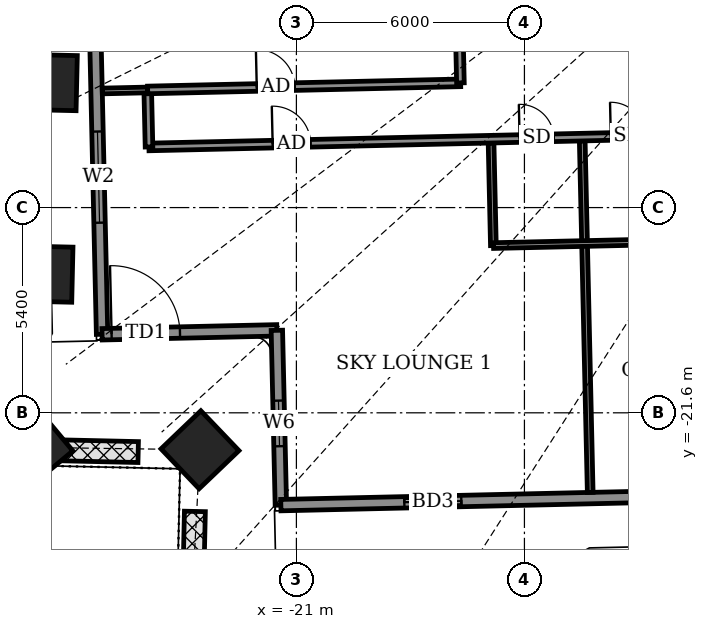
"""IFC4 building model, lengths in metres.
Left out: names, types, materials, properties, quantities, classifications, styles, units other than length and angle.
Written with IfcOpenShell. Run it as: python <this file> out.ifc"""

import sys

from ifc_helpers import new_model, si_unit, direction, frame, frame_2d, origin, origin_2d, place, context, subcontext, project, spatial, rectangle, extrude, element, fill, save


model = new_model("IFC4")
c1 = context("Model", 3, precision=1e-05, world=origin(), true_north=direction((0.0, 1.0)))
c2 = subcontext(c1, "Body", "Model", "MODEL_VIEW")
j1 = project(units=[si_unit("LENGTHUNIT", "METRE"), si_unit("PLANEANGLEUNIT", "RADIAN")], contexts=[c1])
p1 = place(None, origin())
s1 = spatial("IfcSite", under=j1, at=p1, CompositionType="ELEMENT")
p2 = place(p1, origin())
s2 = spatial("IfcBuilding", under=s1, at=p2, CompositionType="ELEMENT")
p3 = place(p2, frame((0.0, 0.0, 74.7)))
s3 = spatial("IfcBuildingStorey", under=s2, at=p3, CompositionType="ELEMENT", Elevation=74.7)
for number, where, z_axis, x_axis in (
    (1, (-27.506, -12.909, -0.55), (0.0, 0.0, 1.0), (-0.023, -1.0, 0.0)),
    (2, (-27.62, -17.949, -0.55), (0.0, 0.0, 1.0), (-0.023, -1.0, 0.0)),
    (3, (-27.903, -22.51, -0.55), (0.0, 0.0, 1.0), (0.64, -0.768, 0.0)),
    (4, (-23.537, -22.572, -0.55), (0.0, 0.0, 1.0), (0.691, -0.723, 0.0)),
):
    element("IfcColumn", number, at=place(p3, frame(where, z_axis=z_axis, x_axis=x_axis)), inside=s3, PredefinedType="COLUMN", context=c2, shape_type="SweptSolid", body=[
        extrude(rectangle(XDim=1.45, YDim=1.45, at=origin_2d()), origin(), (0.0, 0.0, 1.0), 4.6),
    ])
p4 = place(p3, frame((-26.424, -5.808, 0.0), z_axis=(0.0, 0.0, 1.0), x_axis=(0.022654755793, -0.999743348085, 0.0)))
e5 = element("IfcWall", 5, at=p4, inside=s3, PredefinedType="SOLIDWALL", context=c2, shape_type="SweptSolid", body=[
    extrude(rectangle(XDim=13.729, YDim=0.3, at=frame_2d((6.865, 0.0))), origin(), (0.0, 0.0, 1.0), 2.45),
])
p5 = place(p4, frame((2.913, 0.0, 0.0)))
e6 = element("IfcOpeningElement", 6, at=p5, cuts=e5, PredefinedType="OPENING", context=c2, shape_type="SweptSolid", body=[
    extrude(rectangle(XDim=1.2, YDim=2.4, at=frame_2d((0.6, 1.2))), frame((0.0, 0.16, 0.0), z_axis=(0.0, -1.0, 0.0), x_axis=(1.0, 0.0, 0.0)), (0.0, 0.0, 1.0), 0.32),
])
p6 = place(p4, frame((4.823, 0.0, 0.9)))
e7 = element("IfcOpeningElement", 7, at=p6, cuts=e5, PredefinedType="OPENING", context=c2, shape_type="SweptSolid", body=[
    extrude(rectangle(XDim=1.2, YDim=1.5, at=frame_2d((0.6, 0.75))), frame((0.0, 0.16, 0.0), z_axis=(0.0, -1.0, 0.0), x_axis=(1.0, 0.0, 0.0)), (0.0, 0.0, 1.0), 0.32),
])
p7 = place(p4, frame((8.393, 0.0, 0.9)))
e8 = element("IfcOpeningElement", 8, at=p7, cuts=e5, PredefinedType="OPENING", context=c2, shape_type="SweptSolid", body=[
    extrude(rectangle(XDim=2.4, YDim=1.5, at=frame_2d((1.2, 0.75))), frame((0.0, 0.16, 0.0), z_axis=(0.0, -1.0, 0.0), x_axis=(1.0, 0.0, 0.0)), (0.0, 0.0, 1.0), 0.32),
])
p8 = place(p3, frame((-26.113, -19.534, 0.0), z_axis=(0.0, 0.0, 1.0), x_axis=(0.999744404568, 0.02260808559, 0.0)))
e9 = element("IfcWall", 9, at=p8, inside=s3, PredefinedType="SOLIDWALL", context=c2, shape_type="SweptSolid", body=[
    extrude(rectangle(XDim=4.6, YDim=0.3, at=frame_2d((2.3, 0.0))), origin(), (0.0, 0.0, 1.0), 2.45),
])
p9 = place(p8, frame((0.25, 0.0, 0.0)))
e10 = element("IfcOpeningElement", 10, at=p9, cuts=e9, PredefinedType="OPENING", context=c2, shape_type="SweptSolid", body=[
    extrude(rectangle(XDim=1.8, YDim=2.4, at=frame_2d((0.9, 1.2))), frame((0.0, 0.16, 0.0), z_axis=(0.0, -1.0, 0.0), x_axis=(1.0, 0.0, 0.0)), (0.0, 0.0, 1.0), 0.32),
])
p10 = place(p3, frame((-21.514, -19.43, 0.0), z_axis=(0.0, 0.0, 1.0), x_axis=(0.022820258049, -0.999739584003, 0.0)))
e11 = element("IfcWall", 11, at=p10, inside=s3, PredefinedType="SOLIDWALL", context=c2, shape_type="SweptSolid", body=[
    extrude(rectangle(XDim=4.6, YDim=0.3, at=frame_2d((2.3, 0.0))), origin(), (0.0, 0.0, 1.0), 2.1),
])
p11 = place(p10, frame((1.85, 0.0, 0.5)))
e12 = element("IfcOpeningElement", 12, at=p11, cuts=e11, PredefinedType="OPENING", context=c2, shape_type="SweptSolid", body=[
    extrude(rectangle(XDim=1.2, YDim=1.1, at=frame_2d((0.6, 0.55))), frame((0.0, 0.16, 0.0), z_axis=(0.0, -1.0, 0.0), x_axis=(1.0, 0.0, 0.0)), (0.0, 0.0, 1.0), 0.32),
])
p12 = place(p3, frame((-21.409, -24.029, 0.0), z_axis=(0.0, 0.0, 1.0), x_axis=(0.999742634032, 0.022686244721, 0.0)))
e13 = element("IfcWall", 13, at=p12, inside=s3, PredefinedType="SOLIDWALL", context=c2, shape_type="SweptSolid", body=[
    extrude(rectangle(XDim=46.372, YDim=0.3, at=frame_2d((23.186, 0.0))), origin(), (0.0, 0.0, 1.0), 2.1),
])
p13 = place(p12, frame((3.25, 0.0, 0.0)))
e14 = element("IfcOpeningElement", 14, at=p13, cuts=e13, PredefinedType="OPENING", context=c2, shape_type="SweptSolid", body=[
    extrude(rectangle(XDim=1.5, YDim=2.0, at=frame_2d((0.75, 1.0))), frame((0.0, 0.16, 0.0), z_axis=(0.0, -1.0, 0.0), x_axis=(1.0, 0.0, 0.0)), (0.0, 0.0, 1.0), 0.32),
])
p14 = place(p12, frame((10.575, 0.0, 0.5)))
e15 = element("IfcOpeningElement", 15, at=p14, cuts=e13, PredefinedType="OPENING", context=c2, shape_type="SweptSolid", body=[
    extrude(rectangle(XDim=1.2, YDim=1.1, at=frame_2d((0.6, 0.55))), frame((0.0, 0.16, 0.0), z_axis=(0.0, -1.0, 0.0), x_axis=(1.0, 0.0, 0.0)), (0.0, 0.0, 1.0), 0.32),
])
p15 = place(p12, frame((15.95, 0.0, 0.5)))
e16 = element("IfcOpeningElement", 16, at=p15, cuts=e13, PredefinedType="OPENING", context=c2, shape_type="SweptSolid", body=[
    extrude(rectangle(XDim=1.2, YDim=1.1, at=frame_2d((0.6, 0.55))), frame((0.0, 0.16, 0.0), z_axis=(0.0, -1.0, 0.0), x_axis=(1.0, 0.0, 0.0)), (0.0, 0.0, 1.0), 0.32),
])
p16 = place(p12, frame((20.575, 0.0, 0.0)))
e17 = element("IfcOpeningElement", 17, at=p16, cuts=e13, PredefinedType="OPENING", context=c2, shape_type="SweptSolid", body=[
    extrude(rectangle(XDim=1.5, YDim=2.0, at=frame_2d((0.75, 1.0))), frame((0.0, 0.16, 0.0), z_axis=(0.0, -1.0, 0.0), x_axis=(1.0, 0.0, 0.0)), (0.0, 0.0, 1.0), 0.32),
])
p17 = place(p12, frame((25.35, 0.0, 0.0)))
e18 = element("IfcOpeningElement", 18, at=p17, cuts=e13, PredefinedType="OPENING", context=c2, shape_type="SweptSolid", body=[
    extrude(rectangle(XDim=1.5, YDim=2.0, at=frame_2d((0.75, 1.0))), frame((0.0, 0.16, 0.0), z_axis=(0.0, -1.0, 0.0), x_axis=(1.0, 0.0, 0.0)), (0.0, 0.0, 1.0), 0.32),
])
p18 = place(p12, frame((30.125, 0.0, 0.0)))
e19 = element("IfcOpeningElement", 19, at=p18, cuts=e13, PredefinedType="OPENING", context=c2, shape_type="SweptSolid", body=[
    extrude(rectangle(XDim=1.5, YDim=2.0, at=frame_2d((0.75, 1.0))), frame((0.0, 0.16, 0.0), z_axis=(0.0, -1.0, 0.0), x_axis=(1.0, 0.0, 0.0)), (0.0, 0.0, 1.0), 0.32),
])
p19 = place(p12, frame((36.975, 0.0, 0.5)))
e20 = element("IfcOpeningElement", 20, at=p19, cuts=e13, PredefinedType="OPENING", context=c2, shape_type="SweptSolid", body=[
    extrude(rectangle(XDim=1.2, YDim=1.1, at=frame_2d((0.6, 0.55))), frame((0.0, 0.16, 0.0), z_axis=(0.0, -1.0, 0.0), x_axis=(1.0, 0.0, 0.0)), (0.0, 0.0, 1.0), 0.32),
])
p20 = place(p12, frame((43.115, 0.0, 0.5)))
e21 = element("IfcOpeningElement", 21, at=p20, cuts=e13, PredefinedType="OPENING", context=c2, shape_type="SweptSolid", body=[
    extrude(rectangle(XDim=1.2, YDim=1.1, at=frame_2d((0.6, 0.55))), frame((0.0, 0.16, 0.0), z_axis=(0.0, -1.0, 0.0), x_axis=(1.0, 0.0, 0.0)), (0.0, 0.0, 1.0), 0.32),
])
for number, where, z_axis, x_axis in (
    (22, (-23.726, -26.632, 0.0), (0.0, 0.0, 1.0), (0.023, 1.0, 0.0)),
    (23, (-25.163, -22.633, 0.0), (0.0, 0.0, 1.0), (-1.0, 0.023, 0.0)),
):
    element("IfcWall", number, at=place(p3, frame(where, z_axis=z_axis, x_axis=x_axis)), inside=s3, PredefinedType="USERDEFINED", context=c2, shape_type="SweptSolid", body=[
        extrude(rectangle(XDim=2.438, YDim=0.55, at=frame_2d((1.219, 0.0))), origin(), (0.0, 0.0, 1.0), 0.8),
    ])
p21 = place(p3, frame((-13.269, -23.694, 0.0), z_axis=(0.0, 0.0, 1.0), x_axis=(-0.022697424684, 0.999742380272, 0.0)))
e24 = element("IfcWall", 24, at=p21, inside=s3, PredefinedType="PARTITIONING", context=c2, shape_type="SweptSolid", body=[
    extrude(rectangle(XDim=9.25, YDim=0.15, at=frame_2d((4.625, 0.0))), origin(), (0.0, 0.0, 1.0), 2.1),
])
p22 = place(p3, frame((-15.817, -17.2, 0.0), z_axis=(0.0, 0.0, 1.0), x_axis=(-0.02260842146, 0.999744396973, 0.0)))
e25 = element("IfcWall", 25, at=p22, inside=s3, PredefinedType="PARTITIONING", context=c2, shape_type="SweptSolid", body=[
    extrude(rectangle(XDim=2.7, YDim=0.15, at=frame_2d((1.35, 0.0))), origin(), (0.0, 0.0, 1.0), 2.1),
])
p23 = place(p3, frame((-15.813, -17.2, 0.0), z_axis=(0.0, 0.0, 1.0), x_axis=(0.999742701292, 0.022683280499, 0.0)))
e26 = element("IfcWall", 26, at=p23, inside=s3, PredefinedType="PARTITIONING", context=c2, shape_type="SweptSolid", body=[
    extrude(rectangle(XDim=4.8, YDim=0.15, at=frame_2d((2.4, 0.0))), origin(), (0.0, 0.0, 1.0), 2.1),
])
p24 = place(p3, frame((-24.88, -14.605, 0.0), z_axis=(0.0, 0.0, 1.0), x_axis=(0.999742652859, 0.022685415006, 0.0)))
e27 = element("IfcWall", 27, at=p24, inside=s3, PredefinedType="PARTITIONING", context=c2, shape_type="SweptSolid", body=[
    extrude(rectangle(XDim=53.778, YDim=0.2, at=frame_2d((26.889, 0.0))), origin(), (0.0, 0.0, 1.0), 2.1),
])
p25 = place(p24, frame((3.256, 0.0, 0.0)))
e28 = element("IfcOpeningElement", 28, at=p25, cuts=e27, PredefinedType="OPENING", context=c2, shape_type="SweptSolid", body=[
    extrude(rectangle(XDim=1.0, YDim=2.1, at=frame_2d((0.5, 1.05))), frame((0.0, 0.11, 0.0), z_axis=(0.0, -1.0, 0.0), x_axis=(1.0, 0.0, 0.0)), (0.0, 0.0, 1.0), 0.22),
])
p26 = place(p24, frame((9.756, 0.0, 0.0)))
e29 = element("IfcOpeningElement", 29, at=p26, cuts=e27, PredefinedType="OPENING", context=c2, shape_type="SweptSolid", body=[
    extrude(rectangle(XDim=0.9, YDim=2.1, at=frame_2d((0.45, 1.05))), frame((0.0, 0.11, 0.0), z_axis=(0.0, -1.0, 0.0), x_axis=(1.0, 0.0, 0.0)), (0.0, 0.0, 1.0), 0.22),
])
p27 = place(p24, frame((15.131, 0.0, 0.0)))
e30 = element("IfcOpeningElement", 30, at=p27, cuts=e27, PredefinedType="OPENING", context=c2, shape_type="SweptSolid", body=[
    extrude(rectangle(XDim=1.0, YDim=2.1, at=frame_2d((0.5, 1.05))), frame((0.0, 0.11, 0.0), z_axis=(0.0, -1.0, 0.0), x_axis=(1.0, 0.0, 0.0)), (0.0, 0.0, 1.0), 0.22),
])
p28 = place(p24, frame((12.156, 0.0, 0.0)))
e31 = element("IfcOpeningElement", 31, at=p28, cuts=e27, PredefinedType="OPENING", context=c2, shape_type="SweptSolid", body=[
    extrude(rectangle(XDim=0.9, YDim=2.1, at=frame_2d((0.45, 1.05))), frame((0.0, 0.11, 0.0), z_axis=(0.0, -1.0, 0.0), x_axis=(1.0, 0.0, 0.0)), (0.0, 0.0, 1.0), 0.22),
])
p29 = place(p24, frame((18.006, 0.0, 0.0)))
e32 = element("IfcOpeningElement", 32, at=p29, cuts=e27, PredefinedType="OPENING", context=c2, shape_type="SweptSolid", body=[
    extrude(rectangle(XDim=1.0, YDim=2.1, at=frame_2d((0.5, 1.05))), frame((0.0, 0.11, 0.0), z_axis=(0.0, -1.0, 0.0), x_axis=(1.0, 0.0, 0.0)), (0.0, 0.0, 1.0), 0.22),
])
p30 = place(p24, frame((20.406, 0.0, 0.0)))
e33 = element("IfcOpeningElement", 33, at=p30, cuts=e27, PredefinedType="OPENING", context=c2, shape_type="SweptSolid", body=[
    extrude(rectangle(XDim=0.9, YDim=2.1, at=frame_2d((0.45, 1.05))), frame((0.0, 0.11, 0.0), z_axis=(0.0, -1.0, 0.0), x_axis=(1.0, 0.0, 0.0)), (0.0, 0.0, 1.0), 0.22),
])
p31 = place(p24, frame((25.331, 0.0, 0.0)))
e34 = element("IfcOpeningElement", 34, at=p31, cuts=e27, PredefinedType="OPENING", context=c2, shape_type="SweptSolid", body=[
    extrude(rectangle(XDim=0.9, YDim=2.1, at=frame_2d((0.45, 1.05))), frame((0.0, 0.11, 0.0), z_axis=(0.0, -1.0, 0.0), x_axis=(1.0, 0.0, 0.0)), (0.0, 0.0, 1.0), 0.22),
])
p32 = place(p24, frame((27.706, 0.0, 0.0)))
e35 = element("IfcOpeningElement", 35, at=p32, cuts=e27, PredefinedType="OPENING", context=c2, shape_type="SweptSolid", body=[
    extrude(rectangle(XDim=0.9, YDim=2.1, at=frame_2d((0.45, 1.05))), frame((0.0, 0.11, 0.0), z_axis=(0.0, -1.0, 0.0), x_axis=(1.0, 0.0, 0.0)), (0.0, 0.0, 1.0), 0.22),
])
p33 = place(p24, frame((34.881, 0.0, 0.0)))
e36 = element("IfcOpeningElement", 36, at=p33, cuts=e27, PredefinedType="OPENING", context=c2, shape_type="SweptSolid", body=[
    extrude(rectangle(XDim=0.9, YDim=2.1, at=frame_2d((0.45, 1.05))), frame((0.0, 0.11, 0.0), z_axis=(0.0, -1.0, 0.0), x_axis=(1.0, 0.0, 0.0)), (0.0, 0.0, 1.0), 0.22),
])
p34 = place(p24, frame((40.331, 0.0, 0.0)))
e37 = element("IfcOpeningElement", 37, at=p34, cuts=e27, PredefinedType="OPENING", context=c2, shape_type="SweptSolid", body=[
    extrude(rectangle(XDim=1.0, YDim=2.1, at=frame_2d((0.5, 1.05))), frame((0.0, 0.11, 0.0), z_axis=(0.0, -1.0, 0.0), x_axis=(1.0, 0.0, 0.0)), (0.0, 0.0, 1.0), 0.22),
])
p35 = place(p24, frame((50.842, 0.0, 0.0)))
e38 = element("IfcOpeningElement", 38, at=p35, cuts=e27, PredefinedType="OPENING", context=c2, shape_type="SweptSolid", body=[
    extrude(rectangle(XDim=1.0, YDim=2.1, at=frame_2d((0.5, 1.05))), frame((0.0, 0.11, 0.0), z_axis=(0.0, -1.0, 0.0), x_axis=(1.0, 0.0, 0.0)), (0.0, 0.0, 1.0), 0.22),
])
p36 = place(p24, frame((45.856, 0.0, 0.0)))
e39 = element("IfcOpeningElement", 39, at=p36, cuts=e27, PredefinedType="OPENING", context=c2, shape_type="SweptSolid", body=[
    extrude(rectangle(XDim=0.9, YDim=2.1, at=frame_2d((0.45, 1.05))), frame((0.0, 0.11, 0.0), z_axis=(0.0, -1.0, 0.0), x_axis=(1.0, 0.0, 0.0)), (0.0, 0.0, 1.0), 0.22),
])
p37 = place(p3, frame((-24.878, -14.605, 0.0), z_axis=(0.0, 0.0, 1.0), x_axis=(-0.022780545013, 0.999740489712, 0.0)))
e40 = element("IfcWall", 40, at=p37, inside=s3, PredefinedType="PARTITIONING", context=c2, shape_type="SweptSolid", body=[
    extrude(rectangle(XDim=1.5, YDim=0.2, at=frame_2d((0.75, 0.0))), origin(), (0.0, 0.0, 1.0), 2.55),
])
p38 = place(p3, frame((-26.108, -13.132, 0.0), z_axis=(0.0, 0.0, 1.0), x_axis=(0.999744249074, 0.022614960597, 0.0)))
e41 = element("IfcWall", 41, at=p38, inside=s3, PredefinedType="PARTITIONING", context=c2, shape_type="SweptSolid", body=[
    extrude(rectangle(XDim=1.198, YDim=0.15, at=frame_2d((0.599, 0.0))), origin(), (0.0, 0.0, 1.0), 2.55),
])
p39 = place(p3, frame((-24.914, -13.105, 0.0), z_axis=(0.0, 0.0, 1.0), x_axis=(0.999742248516, 0.022703227368, 0.0)))
e42 = element("IfcWall", 42, at=p39, inside=s3, PredefinedType="PARTITIONING", context=c2, shape_type="SweptSolid", body=[
    extrude(rectangle(XDim=8.237, YDim=0.2, at=frame_2d((4.119, 0.0))), origin(), (0.0, 0.0, 1.0), 2.45),
])
p40 = place(p39, frame((2.872, 0.0, 0.0)))
e43 = element("IfcOpeningElement", 43, at=p40, cuts=e42, PredefinedType="OPENING", context=c2, shape_type="SweptSolid", body=[
    extrude(rectangle(XDim=1.0, YDim=2.1, at=frame_2d((0.5, 1.05))), frame((0.0, 0.11, 0.0), z_axis=(0.0, -1.0, 0.0), x_axis=(1.0, 0.0, 0.0)), (0.0, 0.0, 1.0), 0.22),
])
p41 = place(p3, frame((-16.684, -12.919, 0.0), z_axis=(0.0, 0.0, 1.0), x_axis=(-0.022706151961, 0.999742182097, 0.0)))
e44 = element("IfcWall", 44, at=p41, inside=s3, PredefinedType="PARTITIONING", context=c2, shape_type="SweptSolid", body=[
    extrude(rectangle(XDim=25.45, YDim=0.2, at=frame_2d((12.725, 0.0))), origin(), (0.0, 0.0, 1.0), 2.45),
])
p42 = place(p41, frame((21.538, 0.0, 0.0)))
e45 = element("IfcOpeningElement", 45, at=p42, cuts=e44, PredefinedType="OPENING", context=c2, shape_type="SweptSolid", body=[
    extrude(rectangle(XDim=1.0, YDim=2.1, at=frame_2d((0.5, 1.05))), frame((0.0, 0.11, 0.0), z_axis=(0.0, -1.0, 0.0), x_axis=(1.0, 0.0, 0.0)), (0.0, 0.0, 1.0), 0.22),
])
p43 = place(p41, frame((23.8, 0.0, 0.0)))
e46 = element("IfcOpeningElement", 46, at=p43, cuts=e44, PredefinedType="OPENING", context=c2, shape_type="SweptSolid", body=[
    extrude(rectangle(XDim=0.9, YDim=2.1, at=frame_2d((0.45, 1.05))), frame((0.0, 0.11, 0.0), z_axis=(0.0, -1.0, 0.0), x_axis=(1.0, 0.0, 0.0)), (0.0, 0.0, 1.0), 0.22),
])
p44 = place(p41, frame((17.796, 0.0, 0.0)))
e47 = element("IfcOpeningElement", 47, at=p44, cuts=e44, PredefinedType="OPENING", context=c2, shape_type="SweptSolid", body=[
    extrude(rectangle(XDim=1.0, YDim=2.1, at=frame_2d((0.5, 1.05))), frame((0.0, 0.11, 0.0), z_axis=(0.0, -1.0, 0.0), x_axis=(1.0, 0.0, 0.0)), (0.0, 0.0, 1.0), 0.22),
])
p45 = place(p41, frame((13.205, 0.0, 0.0)))
e48 = element("IfcOpeningElement", 48, at=p45, cuts=e44, PredefinedType="OPENING", context=c2, shape_type="SweptSolid", body=[
    extrude(rectangle(XDim=1.0, YDim=2.1, at=frame_2d((0.5, 1.05))), frame((0.0, 0.11, 0.0), z_axis=(0.0, -1.0, 0.0), x_axis=(1.0, 0.0, 0.0)), (0.0, 0.0, 1.0), 0.22),
])
p46 = place(p41, frame((9.031, 0.0, 0.0)))
e49 = element("IfcOpeningElement", 49, at=p46, cuts=e44, PredefinedType="OPENING", context=c2, shape_type="SweptSolid", body=[
    extrude(rectangle(XDim=1.0, YDim=2.1, at=frame_2d((0.5, 1.05))), frame((0.0, 0.11, 0.0), z_axis=(0.0, -1.0, 0.0), x_axis=(1.0, 0.0, 0.0)), (0.0, 0.0, 1.0), 0.22),
])
p47 = place(p41, frame((5.837, 0.0, 0.0)))
e50 = element("IfcOpeningElement", 50, at=p47, cuts=e44, PredefinedType="OPENING", context=c2, shape_type="SweptSolid", body=[
    extrude(rectangle(XDim=1.0, YDim=2.1, at=frame_2d((0.5, 1.05))), frame((0.0, 0.11, 0.0), z_axis=(0.0, -1.0, 0.0), x_axis=(1.0, 0.0, 0.0)), (0.0, 0.0, 1.0), 0.22),
])
p48 = place(p41, frame((3.75, 0.0, 0.0)))
e51 = element("IfcOpeningElement", 51, at=p48, cuts=e44, PredefinedType="OPENING", context=c2, shape_type="SweptSolid", body=[
    extrude(rectangle(XDim=0.9, YDim=2.1, at=frame_2d((0.45, 1.05))), frame((0.0, 0.11, 0.0), z_axis=(0.0, -1.0, 0.0), x_axis=(1.0, 0.0, 0.0)), (0.0, 0.0, 1.0), 0.22),
])
p49 = place(p7, origin())
e52 = element("IfcWindow", 52, at=p49, inside=s3, PartitioningType="DOUBLE_PANEL_VERTICAL", PredefinedType="WINDOW", context=c2, shape_type="SweptSolid", body=[
    extrude(rectangle(XDim=2.4, YDim=1.5, at=frame_2d((1.2, 0.75))), frame((0.0, 0.03, 0.0), z_axis=(0.0, -1.0, 0.0), x_axis=(1.0, 0.0, 0.0)), (0.0, 0.0, 1.0), 0.06),
])
fill(e8, e52)
p50 = place(p9, origin())
e53 = element("IfcDoor", 53, at=p50, inside=s3, OperationType="DOUBLE_DOOR_SINGLE_SWING", PredefinedType="DOOR", context=c2, shape_type="SweptSolid", body=[
    extrude(rectangle(XDim=1.8, YDim=2.4, at=frame_2d((0.9, 1.2))), frame((0.0, 0.025, 0.0), z_axis=(0.0, -1.0, 0.0), x_axis=(1.0, 0.0, 0.0)), (0.0, 0.0, 1.0), 0.05),
])
fill(e10, e53)
p51 = place(p11, origin())
e54 = element("IfcWindow", 54, at=p51, inside=s3, PartitioningType="SINGLE_PANEL", PredefinedType="WINDOW", context=c2, shape_type="SweptSolid", body=[
    extrude(rectangle(XDim=1.2, YDim=1.1, at=frame_2d((0.6, 0.55))), frame((0.0, 0.03, 0.0), z_axis=(0.0, -1.0, 0.0), x_axis=(1.0, 0.0, 0.0)), (0.0, 0.0, 1.0), 0.06),
])
fill(e12, e54)
p52 = place(p13, origin())
e55 = element("IfcDoor", 55, at=p52, inside=s3, OperationType="SLIDING_TO_LEFT", PredefinedType="DOOR", context=c2, shape_type="SweptSolid", body=[
    extrude(rectangle(XDim=1.5, YDim=2.0, at=frame_2d((0.75, 1.0))), frame((0.0, 0.025, 0.0), z_axis=(0.0, -1.0, 0.0), x_axis=(1.0, 0.0, 0.0)), (0.0, 0.0, 1.0), 0.05),
])
fill(e14, e55)
p53 = place(p25, origin())
e56 = element("IfcDoor", 56, at=p53, inside=s3, OperationType="SINGLE_SWING_LEFT", PredefinedType="DOOR", context=c2, shape_type="SweptSolid", body=[
    extrude(rectangle(XDim=1.0, YDim=2.1, at=frame_2d((0.5, 1.05))), frame((0.0, 0.025, 0.0), z_axis=(0.0, -1.0, 0.0), x_axis=(1.0, 0.0, 0.0)), (0.0, 0.0, 1.0), 0.05),
])
fill(e28, e56)
p54 = place(p26, origin())
e57 = element("IfcDoor", 57, at=p54, inside=s3, OperationType="SINGLE_SWING_LEFT", PredefinedType="DOOR", context=c2, shape_type="SweptSolid", body=[
    extrude(rectangle(XDim=0.9, YDim=2.1, at=frame_2d((0.45, 1.05))), frame((0.0, 0.025, 0.0), z_axis=(0.0, -1.0, 0.0), x_axis=(1.0, 0.0, 0.0)), (0.0, 0.0, 1.0), 0.05),
])
fill(e29, e57)
p55 = place(p28, origin())
e58 = element("IfcDoor", 58, at=p55, inside=s3, OperationType="SINGLE_SWING_RIGHT", PredefinedType="DOOR", context=c2, shape_type="SweptSolid", body=[
    extrude(rectangle(XDim=0.9, YDim=2.1, at=frame_2d((0.45, 1.05))), frame((0.0, 0.025, 0.0), z_axis=(0.0, -1.0, 0.0), x_axis=(1.0, 0.0, 0.0)), (0.0, 0.0, 1.0), 0.05),
])
fill(e31, e58)
p56 = place(p40, origin())
e59 = element("IfcDoor", 59, at=p56, inside=s3, OperationType="SINGLE_SWING_LEFT", PredefinedType="DOOR", context=c2, shape_type="SweptSolid", body=[
    extrude(rectangle(XDim=1.0, YDim=2.1, at=frame_2d((0.5, 1.05))), frame((0.0, 0.025, 0.0), z_axis=(0.0, -1.0, 0.0), x_axis=(1.0, 0.0, 0.0)), (0.0, 0.0, 1.0), 0.05),
])
fill(e43, e59)
save(model, sys.argv[1])
